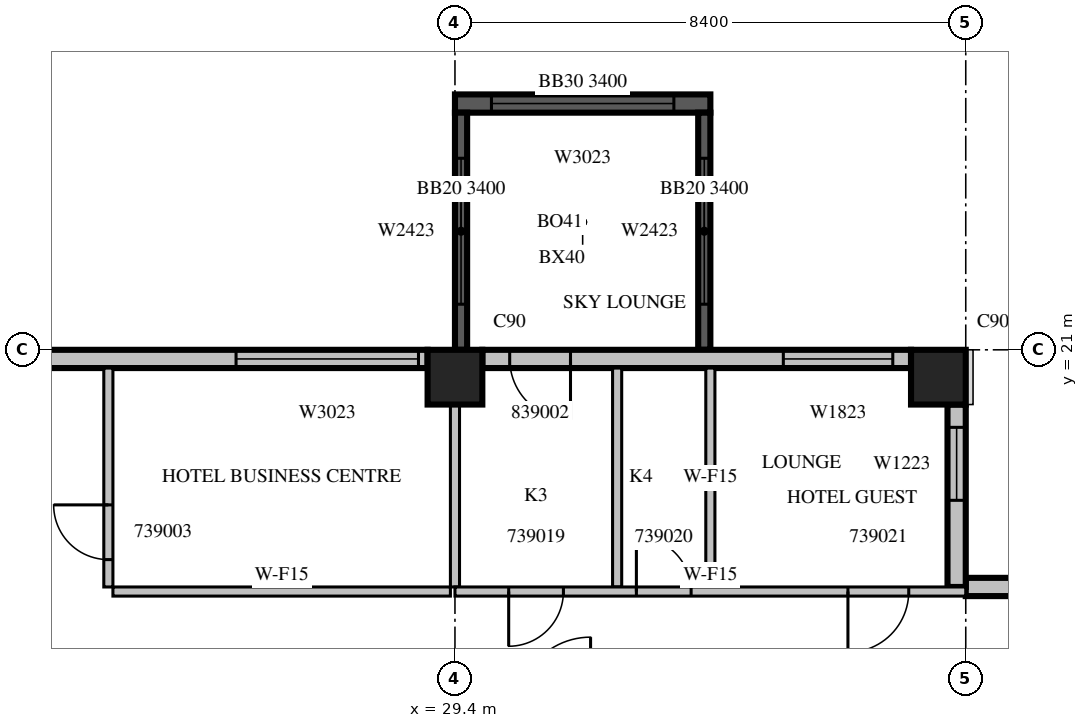
"""IFC4 building model, lengths in metres.
Left out: names, types, materials, properties, quantities, classifications, styles, units other than length and angle.
Written with IfcOpenShell. Run it as: python <this file> out.ifc"""

import sys

from ifc_helpers import new_model, si_unit, direction, frame, frame_2d, origin, origin_2d, place, context, subcontext, project, spatial, rectangle, extrude, source, transform, mapped, element, fill, save


model = new_model("IFC4")
c1 = context("Model", 3, precision=1e-05, world=origin(), true_north=direction((0.0, 1.0)))
c2 = subcontext(c1, "Body", "Model", "MODEL_VIEW")
j1 = project(units=[si_unit("LENGTHUNIT", "METRE"), si_unit("PLANEANGLEUNIT", "RADIAN")], contexts=[c1])
p1 = place(None, origin())
s1 = spatial("IfcSite", under=j1, at=p1, CompositionType="ELEMENT")
p2 = place(p1, origin())
s2 = spatial("IfcBuilding", under=s1, at=p2, CompositionType="ELEMENT")
p3 = place(p2, frame((0.0, 0.0, 181.6)))
s3 = spatial("IfcBuildingStorey", under=s2, at=p3, CompositionType="ELEMENT", Elevation=181.6)
m1 = source(origin(), c2, "Body", "SweptSolid", [
    extrude(rectangle(XDim=0.9, YDim=0.9, at=origin_2d()), origin(), (0.0, 0.0, 1.0), 3.8),
])
for number, where, z_axis, x_axis in (
    (1, (29.4, 20.55, 0.0), (0.0, 0.0, 1.0), (1.0, 0.0, 0.0)),
    (2, (37.35, 20.55, 0.0), (0.0, 0.0, 1.0), (1.0, 0.0, 0.0)),
):
    element("IfcColumn", number, at=place(p3, frame(where, z_axis=z_axis, x_axis=x_axis)), inside=s3, PredefinedType="COLUMN", context=c2, shape_type="MappedRepresentation", body=[
        mapped(m1, transform((0.0, 0.0, 0.0), scale=1.0)),
    ])
p4 = place(p3, frame((33.6, 25.05, 0.0), z_axis=(0.0, 0.0, 1.0), x_axis=(-1.0, 0.0, 0.0)))
e3 = element("IfcWall", 3, at=p4, inside=s3, PredefinedType="SOLIDWALL", context=c2, shape_type="SweptSolid", body=[
    extrude(rectangle(XDim=4.2, YDim=0.3, at=frame_2d((2.1, 0.0))), origin(), (0.0, 0.0, 1.0), 3.4),
])
m2 = source(origin(), c2, "Body", "SweptSolid", [
    extrude(rectangle(XDim=3.0, YDim=2.3, at=frame_2d((1.5, 1.15))), frame((0.0, 0.16, 0.0), z_axis=(0.0, -1.0, 0.0), x_axis=(1.0, 0.0, 0.0)), (0.0, 0.0, 1.0), 0.32),
])
p5 = place(p4, frame((0.6, 0.0, 0.6)))
e4 = element("IfcOpeningElement", 4, at=p5, cuts=e3, PredefinedType="OPENING", context=c2, shape_type="MappedRepresentation", body=[
    mapped(m2, transform((0.0, 0.0, 0.0), scale=1.0)),
])
m3 = source(origin(), c2, "Body", "SweptSolid", [
    extrude(rectangle(XDim=3.9, YDim=0.2, at=frame_2d((1.95, 0.0))), origin(), (0.0, 0.0, 1.0), 3.4),
])
p6 = place(p3, frame((33.5, 21.0, 0.0), z_axis=(0.0, 0.0, 1.0), x_axis=(0.0, 1.0, 0.0)))
e5 = element("IfcWall", 5, at=p6, inside=s3, PredefinedType="SOLIDWALL", context=c2, shape_type="MappedRepresentation", body=[
    mapped(m3, transform((0.0, 0.0, 0.0), scale=1.0)),
])
m4 = source(origin(), c2, "Body", "SweptSolid", [
    extrude(rectangle(XDim=2.4, YDim=2.3, at=frame_2d((1.2, 1.15))), frame((0.0, 0.11, 0.0), z_axis=(0.0, -1.0, 0.0), x_axis=(1.0, 0.0, 0.0)), (0.0, 0.0, 1.0), 0.22),
])
p7 = place(p6, frame((0.75, 0.0, 0.6)))
e6 = element("IfcOpeningElement", 6, at=p7, cuts=e5, PredefinedType="OPENING", context=c2, shape_type="MappedRepresentation", body=[
    mapped(m4, transform((0.0, 0.0, 0.0), scale=1.0)),
])
p8 = place(p3, frame((29.5, 21.0, 0.0), z_axis=(0.0, 0.0, 1.0), x_axis=(0.0, 1.0, 0.0)))
e7 = element("IfcWall", 7, at=p8, inside=s3, PredefinedType="SOLIDWALL", context=c2, shape_type="MappedRepresentation", body=[
    mapped(m3, transform((0.0, 0.0, 0.0), scale=1.0)),
])
p9 = place(p8, frame((0.75, 0.0, 0.6)))
e8 = element("IfcOpeningElement", 8, at=p9, cuts=e7, PredefinedType="OPENING", context=c2, shape_type="MappedRepresentation", body=[
    mapped(m4, transform((0.0, 0.0, 0.0), scale=1.0)),
])
m5 = source(origin(), c2, "Body", "SweptSolid", [
    extrude(rectangle(XDim=21.84, YDim=0.3, at=frame_2d((10.92, 0.0))), origin(), (0.0, 0.0, 1.0), 3.4),
])
p10 = place(p3, frame((59.64, 17.1, 0.0), z_axis=(0.0, 0.0, 1.0), x_axis=(-1.0, 0.0, 0.0)))
e9 = element("IfcWall", 9, at=p10, inside=s3, PredefinedType="STANDARD", context=c2, shape_type="MappedRepresentation", body=[
    mapped(m5, transform((0.0, 0.0, 0.0), scale=1.0)),
])
p11 = place(p10, frame((0.6, 0.0, 0.6)))
e10 = element("IfcOpeningElement", 10, at=p11, cuts=e9, PredefinedType="OPENING", context=c2, shape_type="MappedRepresentation", body=[
    mapped(m2, transform((0.0, 0.0, 0.0), scale=1.0)),
])
p12 = place(p10, frame((4.8, 0.0, 0.6)))
e11 = element("IfcOpeningElement", 11, at=p12, cuts=e9, PredefinedType="OPENING", context=c2, shape_type="MappedRepresentation", body=[
    mapped(m2, transform((0.0, 0.0, 0.0), scale=1.0)),
])
m6 = source(origin(), c2, "Body", "SweptSolid", [
    extrude(rectangle(XDim=3.6, YDim=2.3, at=frame_2d((1.8, 1.15))), frame((0.0, 0.16, 0.0), z_axis=(0.0, -1.0, 0.0), x_axis=(1.0, 0.0, 0.0)), (0.0, 0.0, 1.0), 0.32),
])
p13 = place(p10, frame((9.54, 0.0, 0.6)))
e12 = element("IfcOpeningElement", 12, at=p13, cuts=e9, PredefinedType="OPENING", context=c2, shape_type="MappedRepresentation", body=[
    mapped(m6, transform((0.0, 0.0, 0.0), scale=1.0)),
])
p14 = place(p10, frame((15.42, 0.0, 0.6)))
e13 = element("IfcOpeningElement", 13, at=p14, cuts=e9, PredefinedType="OPENING", context=c2, shape_type="MappedRepresentation", body=[
    mapped(m6, transform((0.0, 0.0, 0.0), scale=1.0)),
])
m7 = source(origin(), c2, "Body", "SweptSolid", [
    extrude(rectangle(XDim=3.0, YDim=0.3, at=frame_2d((1.5, 0.0))), origin(), (0.0, 0.0, 1.0), 3.4),
])
p15 = place(p3, frame((37.65, 17.1, 0.0), z_axis=(0.0, 0.0, 1.0), x_axis=(0.0, 1.0, 0.0)))
e14 = element("IfcWall", 14, at=p15, inside=s3, PredefinedType="STANDARD", context=c2, shape_type="MappedRepresentation", body=[
    mapped(m7, transform((0.0, 0.0, 0.0), scale=1.0)),
])
m8 = source(origin(), c2, "Body", "SweptSolid", [
    extrude(rectangle(XDim=1.2, YDim=2.3, at=frame_2d((0.6, 1.15))), frame((0.0, 0.16, 0.0), z_axis=(0.0, -1.0, 0.0), x_axis=(1.0, 0.0, 0.0)), (0.0, 0.0, 1.0), 0.32),
])
p16 = place(p15, frame((1.425, 0.0, 0.6)))
e15 = element("IfcOpeningElement", 15, at=p16, cuts=e14, PredefinedType="OPENING", context=c2, shape_type="MappedRepresentation", body=[
    mapped(m8, transform((0.0, 0.0, 0.0), scale=1.0)),
])
m9 = source(origin(), c2, "Body", "SweptSolid", [
    extrude(rectangle(XDim=7.05, YDim=0.3, at=frame_2d((3.525, 0.0))), origin(), (0.0, 0.0, 1.0), 3.4),
])
p17 = place(p3, frame((36.9, 20.85, 0.0), z_axis=(0.0, 0.0, 1.0), x_axis=(-1.0, 0.0, 0.0)))
e16 = element("IfcWall", 16, at=p17, inside=s3, PredefinedType="STANDARD", context=c2, shape_type="MappedRepresentation", body=[
    mapped(m9, transform((0.0, 0.0, 0.0), scale=1.0)),
])
m10 = source(origin(), c2, "Body", "SweptSolid", [
    extrude(rectangle(XDim=1.8, YDim=2.3, at=frame_2d((0.9, 1.15))), frame((0.0, 0.16, 0.0), z_axis=(0.0, -1.0, 0.0), x_axis=(1.0, 0.0, 0.0)), (0.0, 0.0, 1.0), 0.32),
])
p18 = place(p17, frame((0.3, 0.0, 0.6)))
e17 = element("IfcOpeningElement", 17, at=p18, cuts=e16, PredefinedType="OPENING", context=c2, shape_type="MappedRepresentation", body=[
    mapped(m10, transform((0.0, 0.0, 0.0), scale=1.0)),
])
m11 = source(origin(), c2, "Body", "SweptSolid", [
    extrude(rectangle(XDim=1.0, YDim=2.1, at=frame_2d((0.5, 1.05))), frame((0.0, 0.16, 0.0), z_axis=(0.0, -1.0, 0.0), x_axis=(1.0, 0.0, 0.0)), (0.0, 0.0, 1.0), 0.32),
])
p19 = place(p17, frame((5.6, 0.0, 0.0)))
e18 = element("IfcOpeningElement", 18, at=p19, cuts=e16, PredefinedType="OPENING", context=c2, shape_type="MappedRepresentation", body=[
    mapped(m11, transform((0.0, 0.0, 0.0), scale=1.0)),
])
m12 = source(origin(), c2, "Body", "SweptSolid", [
    extrude(rectangle(XDim=7.15, YDim=0.3, at=frame_2d((3.575, 0.0))), origin(), (0.0, 0.0, 1.0), 3.4),
])
p20 = place(p3, frame((28.95, 20.85, 0.0), z_axis=(0.0, 0.0, 1.0), x_axis=(-1.0, 0.0, 0.0)))
e19 = element("IfcWall", 19, at=p20, inside=s3, PredefinedType="STANDARD", context=c2, shape_type="MappedRepresentation", body=[
    mapped(m12, transform((0.0, 0.0, 0.0), scale=1.0)),
])
p21 = place(p20, frame((0.15, 0.0, 0.6)))
e20 = element("IfcOpeningElement", 20, at=p21, cuts=e19, PredefinedType="OPENING", context=c2, shape_type="MappedRepresentation", body=[
    mapped(m2, transform((0.0, 0.0, 0.0), scale=1.0)),
])
m13 = source(origin(), c2, "Body", "SweptSolid", [
    extrude(rectangle(XDim=3.6, YDim=0.15, at=frame_2d((1.8, 0.0))), origin(), (0.0, 0.0, 1.0), 3.4),
])
p22 = place(p3, frame((23.7, 20.7, 0.0), z_axis=(0.0, 0.0, 1.0), x_axis=(0.0, -1.0, 0.0)))
e21 = element("IfcWall", 21, at=p22, inside=s3, PredefinedType="PARTITIONING", context=c2, shape_type="MappedRepresentation", body=[
    mapped(m13, transform((0.0, 0.0, 0.0), scale=1.0)),
])
m14 = source(origin(), c2, "Body", "SweptSolid", [
    extrude(rectangle(XDim=0.9, YDim=2.1, at=frame_2d((0.45, 1.05))), frame((0.0, 0.085, 0.0), z_axis=(0.0, -1.0, 0.0), x_axis=(1.0, 0.0, 0.0)), (0.0, 0.0, 1.0), 0.17),
])
p23 = place(p22, frame((2.25, 0.0, 0.0)))
e22 = element("IfcOpeningElement", 22, at=p23, cuts=e21, PredefinedType="OPENING", context=c2, shape_type="MappedRepresentation", body=[
    mapped(m14, transform((0.0, 0.0, 0.0), scale=1.0)),
])
m15 = source(origin(), c2, "Body", "SweptSolid", [
    extrude(rectangle(XDim=5.55, YDim=0.15, at=frame_2d((2.775, 0.0))), origin(), (0.0, 0.0, 1.0), 3.4),
])
p24 = place(p3, frame((23.775, 17.025, 0.0), z_axis=(0.0, 0.0, 1.0), x_axis=(1.0, 0.0, 0.0)))
e23 = element("IfcWall", 23, at=p24, inside=s3, PredefinedType="PARTITIONING", context=c2, shape_type="MappedRepresentation", body=[
    mapped(m15, transform((0.0, 0.0, 0.0), scale=1.0)),
])
m16 = source(origin(), c2, "Body", "SweptSolid", [
    extrude(rectangle(XDim=3.001, YDim=0.15, at=frame_2d((1.5, 0.0))), origin(), (0.0, 0.0, 1.0), 3.4),
])
p25 = place(p3, frame((29.4, 17.1, 0.0), z_axis=(0.0, 0.0, 1.0), x_axis=(0.0, 1.0, 0.0)))
e24 = element("IfcWall", 24, at=p25, inside=s3, PredefinedType="PARTITIONING", context=c2, shape_type="MappedRepresentation", body=[
    mapped(m16, transform((0.0, 0.0, 0.0), scale=1.0)),
])
for number, where, z_axis, x_axis in (
    (25, (32.067, 20.7, 0.0), (0.0, 0.0, 1.0), (0.0, -1.0, 0.0)),
    (26, (33.6, 17.1, 0.0), (0.0, 0.0, 1.0), (0.0, 1.0, 0.0)),
):
    element("IfcWall", number, at=place(p3, frame(where, z_axis=z_axis, x_axis=x_axis)), inside=s3, PredefinedType="PARTITIONING", context=c2, shape_type="MappedRepresentation", body=[
        mapped(m13, transform((0.0, 0.0, 0.0), scale=1.0)),
    ])
m17 = source(origin(), c2, "Body", "SweptSolid", [
    extrude(rectangle(XDim=8.4, YDim=0.15, at=frame_2d((4.2, 0.0))), origin(), (0.0, 0.0, 1.0), 3.4),
])
p26 = place(p3, frame((29.4, 17.025, 0.0), z_axis=(0.0, 0.0, 1.0), x_axis=(1.0, 0.0, 0.0)))
e27 = element("IfcWall", 27, at=p26, inside=s3, PredefinedType="PARTITIONING", context=c2, shape_type="MappedRepresentation", body=[
    mapped(m17, transform((0.0, 0.0, 0.0), scale=1.0)),
])
p27 = place(p26, frame((0.883, 0.0, 0.0)))
e28 = element("IfcOpeningElement", 28, at=p27, cuts=e27, PredefinedType="OPENING", context=c2, shape_type="MappedRepresentation", body=[
    mapped(m14, transform((0.0, 0.0, 0.0), scale=1.0)),
])
p28 = place(p26, frame((2.983, 0.0, 0.0)))
e29 = element("IfcOpeningElement", 29, at=p28, cuts=e27, PredefinedType="OPENING", context=c2, shape_type="MappedRepresentation", body=[
    mapped(m14, transform((0.0, 0.0, 0.0), scale=1.0)),
])
m18 = source(origin(), c2, "Body", "SweptSolid", [
    extrude(rectangle(XDim=1.0, YDim=2.1, at=frame_2d((0.5, 1.05))), frame((0.0, 0.085, 0.0), z_axis=(0.0, -1.0, 0.0), x_axis=(1.0, 0.0, 0.0)), (0.0, 0.0, 1.0), 0.17),
])
p29 = place(p26, frame((6.463, 0.0, 0.0)))
e30 = element("IfcOpeningElement", 30, at=p29, cuts=e27, PredefinedType="OPENING", context=c2, shape_type="MappedRepresentation", body=[
    mapped(m18, transform((0.0, 0.0, 0.0), scale=1.0)),
])
m19 = source(origin(), c2, "Body", "SweptSolid", [
    extrude(rectangle(XDim=3.0, YDim=2.3, at=frame_2d((1.5, 1.15))), frame((0.0, 0.03, 0.0), z_axis=(0.0, -1.0, 0.0), x_axis=(1.0, 0.0, 0.0)), (0.0, 0.0, 1.0), 0.06),
])
p30 = place(p5, origin())
e31 = element("IfcWindow", 31, at=p30, inside=s3, PartitioningType="SINGLE_PANEL", PredefinedType="WINDOW", context=c2, shape_type="MappedRepresentation", body=[
    mapped(m19, transform((0.0, 0.0, 0.0), scale=1.0)),
])
fill(e4, e31)
m20 = source(origin(), c2, "Body", "SweptSolid", [
    extrude(rectangle(XDim=2.4, YDim=2.3, at=frame_2d((1.2, 1.15))), frame((0.0, 0.03, 0.0), z_axis=(0.0, -1.0, 0.0), x_axis=(1.0, 0.0, 0.0)), (0.0, 0.0, 1.0), 0.06),
])
p31 = place(p7, origin())
e32 = element("IfcWindow", 32, at=p31, inside=s3, PartitioningType="SINGLE_PANEL", PredefinedType="WINDOW", context=c2, shape_type="MappedRepresentation", body=[
    mapped(m20, transform((0.0, 0.0, 0.0), scale=1.0)),
])
fill(e6, e32)
p32 = place(p9, origin())
e33 = element("IfcWindow", 33, at=p32, inside=s3, PartitioningType="SINGLE_PANEL", PredefinedType="WINDOW", context=c2, shape_type="MappedRepresentation", body=[
    mapped(m20, transform((0.0, 0.0, 0.0), scale=1.0)),
])
fill(e8, e33)
m21 = source(origin(), c2, "Body", "SweptSolid", [
    extrude(rectangle(XDim=1.2, YDim=2.3, at=frame_2d((0.6, 1.15))), frame((0.0, 0.03, 0.0), z_axis=(0.0, -1.0, 0.0), x_axis=(1.0, 0.0, 0.0)), (0.0, 0.0, 1.0), 0.06),
])
p33 = place(p16, origin())
e34 = element("IfcWindow", 34, at=p33, inside=s3, PartitioningType="SINGLE_PANEL", PredefinedType="WINDOW", context=c2, shape_type="MappedRepresentation", body=[
    mapped(m21, transform((0.0, 0.0, 0.0), scale=1.0)),
])
fill(e15, e34)
m22 = source(origin(), c2, "Body", "SweptSolid", [
    extrude(rectangle(XDim=1.8, YDim=2.3, at=frame_2d((0.9, 1.15))), frame((0.0, 0.03, 0.0), z_axis=(0.0, -1.0, 0.0), x_axis=(1.0, 0.0, 0.0)), (0.0, 0.0, 1.0), 0.06),
])
p34 = place(p18, origin())
e35 = element("IfcWindow", 35, at=p34, inside=s3, PartitioningType="SINGLE_PANEL", PredefinedType="WINDOW", context=c2, shape_type="MappedRepresentation", body=[
    mapped(m22, transform((0.0, 0.0, 0.0), scale=1.0)),
])
fill(e17, e35)
p35 = place(p21, origin())
e36 = element("IfcWindow", 36, at=p35, inside=s3, PartitioningType="SINGLE_PANEL", PredefinedType="WINDOW", context=c2, shape_type="MappedRepresentation", body=[
    mapped(m19, transform((0.0, 0.0, 0.0), scale=1.0)),
])
fill(e20, e36)
m23 = source(origin(), c2, "Body", "SweptSolid", [
    extrude(rectangle(XDim=0.9, YDim=2.1, at=frame_2d((0.45, 1.05))), frame((0.0, 0.025, 0.0), z_axis=(0.0, -1.0, 0.0), x_axis=(1.0, 0.0, 0.0)), (0.0, 0.0, 1.0), 0.05),
])
p36 = place(p23, origin())
e37 = element("IfcDoor", 37, at=p36, inside=s3, OperationType="SINGLE_SWING_RIGHT", PredefinedType="DOOR", context=c2, shape_type="MappedRepresentation", body=[
    mapped(m23, transform((0.0, 0.0, 0.0), scale=1.0)),
])
fill(e22, e37)
p37 = place(p27, origin())
e38 = element("IfcDoor", 38, at=p37, inside=s3, OperationType="SINGLE_SWING_RIGHT", PredefinedType="DOOR", context=c2, shape_type="MappedRepresentation", body=[
    mapped(m23, transform((0.0, 0.0, 0.0), scale=1.0)),
])
fill(e28, e38)
p38 = place(p28, origin())
e39 = element("IfcDoor", 39, at=p38, inside=s3, OperationType="SINGLE_SWING_LEFT", PredefinedType="DOOR", context=c2, shape_type="MappedRepresentation", body=[
    mapped(m23, transform((0.0, 0.0, 0.0), scale=1.0)),
])
fill(e29, e39)
m24 = source(origin(), c2, "Body", "SweptSolid", [
    extrude(rectangle(XDim=1.0, YDim=2.1, at=frame_2d((0.5, 1.05))), frame((0.0, 0.025, 0.0), z_axis=(0.0, -1.0, 0.0), x_axis=(1.0, 0.0, 0.0)), (0.0, 0.0, 1.0), 0.05),
])
p39 = place(p29, origin())
e40 = element("IfcDoor", 40, at=p39, inside=s3, OperationType="SINGLE_SWING_RIGHT", PredefinedType="DOOR", context=c2, shape_type="MappedRepresentation", body=[
    mapped(m24, transform((0.0, 0.0, 0.0), scale=1.0)),
])
fill(e30, e40)
p40 = place(p19, origin())
e41 = element("IfcDoor", 41, at=p40, inside=s3, OperationType="SINGLE_SWING_LEFT", PredefinedType="DOOR", context=c2, shape_type="MappedRepresentation", body=[
    mapped(m24, transform((0.0, 0.0, 0.0), scale=1.0)),
])
fill(e18, e41)
save(model, sys.argv[1])
